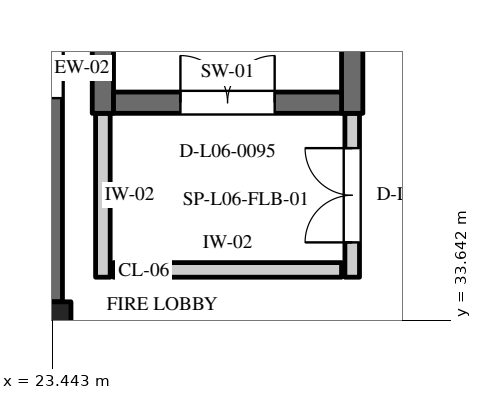
"""IFC4 building model, lengths in metres.
Left out: names, types, materials, properties, quantities, classifications, styles, units other than length and angle.
Written with IfcOpenShell. Run it as: python <this file> out.ifc"""

import sys

from ifc_helpers import new_model, si_unit, direction, frame, frame_2d, origin, origin_2d, place, context, subcontext, project, spatial, rectangle, extrude, element, fill, save


model = new_model("IFC4")
c1 = context("Model", 3, precision=1e-05, world=origin(), true_north=direction((0.0, 1.0)))
c2 = subcontext(c1, "Body", "Model", "MODEL_VIEW")
j1 = project(units=[si_unit("LENGTHUNIT", "METRE"), si_unit("PLANEANGLEUNIT", "RADIAN")], contexts=[c1])
p1 = place(None, origin())
s1 = spatial("IfcSite", under=j1, at=p1, CompositionType="ELEMENT")
p2 = place(p1, origin())
s2 = spatial("IfcBuilding", under=s1, at=p2, CompositionType="ELEMENT")
p3 = place(p2, frame((0.0, 0.0, 26.1)))
s3 = spatial("IfcBuildingStorey", under=s2, at=p3, CompositionType="ELEMENT", Elevation=26.1)
p4 = place(p3, frame((23.4, 33.6, 0.0), z_axis=(0.0, 0.0, 1.0), x_axis=(1.0, 0.0, 0.0)))
e1 = element("IfcColumn", 1, at=p4, inside=s3, PredefinedType="COLUMN", context=c2, shape_type="SweptSolid", body=[
    extrude(rectangle(XDim=0.7, YDim=0.7, at=origin_2d()), origin(), (0.0, 0.0, 1.0), 3.6),
])
p5 = place(p3, frame((23.4, 33.95, 0.0), z_axis=(0.0, 0.0, 1.0), x_axis=(0.0, 1.0, 0.0)))
e2 = element("IfcWall", 2, at=p5, inside=s3, PredefinedType="SOLIDWALL", context=c2, shape_type="SweptSolid", body=[
    extrude(rectangle(XDim=7.7, YDim=0.42, at=frame_2d((3.85, 0.0))), origin(), (0.0, 0.0, 1.0), 2.65),
])
p6 = place(p5, frame((3.35, 0.0, 0.8)))
e3 = element("IfcOpeningElement", 3, at=p6, cuts=e2, PredefinedType="OPENING", context=c2, shape_type="SweptSolid", body=[
    extrude(rectangle(XDim=1.0, YDim=1.45, at=frame_2d((0.5, 0.725))), frame((0.0, 0.222, 0.0), z_axis=(0.0, -1.0, 0.0), x_axis=(1.0, 0.0, 0.0)), (0.0, 0.0, 1.0), 0.444),
])
for number, where, z_axis, x_axis in (
    (4, (24.275, 37.05, 0.0), (0.0, 0.0, 1.0), (0.0, 1.0, 0.0)),
    (5, (28.375, 37.05, 0.0), (0.0, 0.0, 1.0), (0.0, 1.0, 0.0)),
):
    element("IfcWall", number, at=place(p3, frame(where, z_axis=z_axis, x_axis=x_axis)), inside=s3, PredefinedType="SHEAR", context=c2, shape_type="SweptSolid", body=[
        extrude(rectangle(XDim=10.5, YDim=0.35, at=frame_2d((5.25, 0.0))), origin(), (0.0, 0.0, 1.0), 3.6),
    ])
p7 = place(p3, frame((24.45, 37.225, 0.0), z_axis=(0.0, 0.0, 1.0), x_axis=(1.0, 0.0, 0.0)))
e6 = element("IfcWall", 6, at=p7, inside=s3, PredefinedType="SHEAR", context=c2, shape_type="SweptSolid", body=[
    extrude(rectangle(XDim=3.75, YDim=0.35, at=frame_2d((1.875, 0.0))), origin(), (0.0, 0.0, 1.0), 3.3),
])
p8 = place(p7, frame((1.1, 0.0, 0.0)))
e7 = element("IfcOpeningElement", 7, at=p8, cuts=e6, PredefinedType="OPENING", context=c2, shape_type="SweptSolid", body=[
    extrude(rectangle(XDim=1.55, YDim=2.25, at=frame_2d((0.775, 1.125))), frame((0.0, 0.187, 0.0), z_axis=(0.0, -1.0, 0.0), x_axis=(1.0, 0.0, 0.0)), (0.0, 0.0, 1.0), 0.374),
])
p9 = place(p3, frame((24.275, 34.355, 0.0), z_axis=(0.0, 0.0, 1.0), x_axis=(0.0, 1.0, 0.0)))
e8 = element("IfcWall", 8, at=p9, inside=s3, PredefinedType="STANDARD", context=c2, shape_type="SweptSolid", body=[
    extrude(rectangle(XDim=2.695, YDim=0.24, at=frame_2d((1.348, 0.0))), origin(), (0.0, 0.0, 1.0), 3.3),
])
p10 = place(p3, frame((28.375, 34.355, 0.0), z_axis=(0.0, 0.0, 1.0), x_axis=(0.0, 1.0, 0.0)))
e9 = element("IfcWall", 9, at=p10, inside=s3, PredefinedType="STANDARD", context=c2, shape_type="SweptSolid", body=[
    extrude(rectangle(XDim=2.695, YDim=0.24, at=frame_2d((1.348, 0.0))), origin(), (0.0, 0.0, 1.0), 3.3),
])
p11 = place(p10, frame((0.573, 0.0, 0.0)))
e10 = element("IfcOpeningElement", 10, at=p11, cuts=e9, PredefinedType="OPENING", context=c2, shape_type="SweptSolid", body=[
    extrude(rectangle(XDim=1.55, YDim=2.25, at=frame_2d((0.775, 1.125))), frame((0.0, 0.132, 0.0), z_axis=(0.0, -1.0, 0.0), x_axis=(1.0, 0.0, 0.0)), (0.0, 0.0, 1.0), 0.264),
])
p12 = place(p3, frame((24.45, 34.475, 0.0), z_axis=(0.0, 0.0, 1.0), x_axis=(1.0, 0.0, 0.0)))
e11 = element("IfcWall", 11, at=p12, inside=s3, PredefinedType="STANDARD", context=c2, shape_type="SweptSolid", body=[
    extrude(rectangle(XDim=3.75, YDim=0.24, at=frame_2d((1.875, 0.0))), origin(), (0.0, 0.0, 1.0), 3.3),
])
p13 = place(p8, origin())
e12 = element("IfcDoor", 12, at=p13, inside=s3, OperationType="DOUBLE_DOOR_SINGLE_SWING", PredefinedType="DOOR", context=c2, shape_type="SweptSolid", body=[
    extrude(rectangle(XDim=1.55, YDim=2.25, at=frame_2d((0.775, 1.125))), frame((0.0, 0.025, 0.0), z_axis=(0.0, -1.0, 0.0), x_axis=(1.0, 0.0, 0.0)), (0.0, 0.0, 1.0), 0.05),
])
fill(e7, e12)
p14 = place(p11, origin())
e13 = element("IfcDoor", 13, at=p14, inside=s3, OperationType="DOUBLE_DOOR_SINGLE_SWING", PredefinedType="DOOR", context=c2, shape_type="SweptSolid", body=[
    extrude(rectangle(XDim=1.55, YDim=2.25, at=frame_2d((0.775, 1.125))), frame((0.0, 0.025, 0.0), z_axis=(0.0, -1.0, 0.0), x_axis=(1.0, 0.0, 0.0)), (0.0, 0.0, 1.0), 0.05),
])
fill(e10, e13)
save(model, sys.argv[1])
